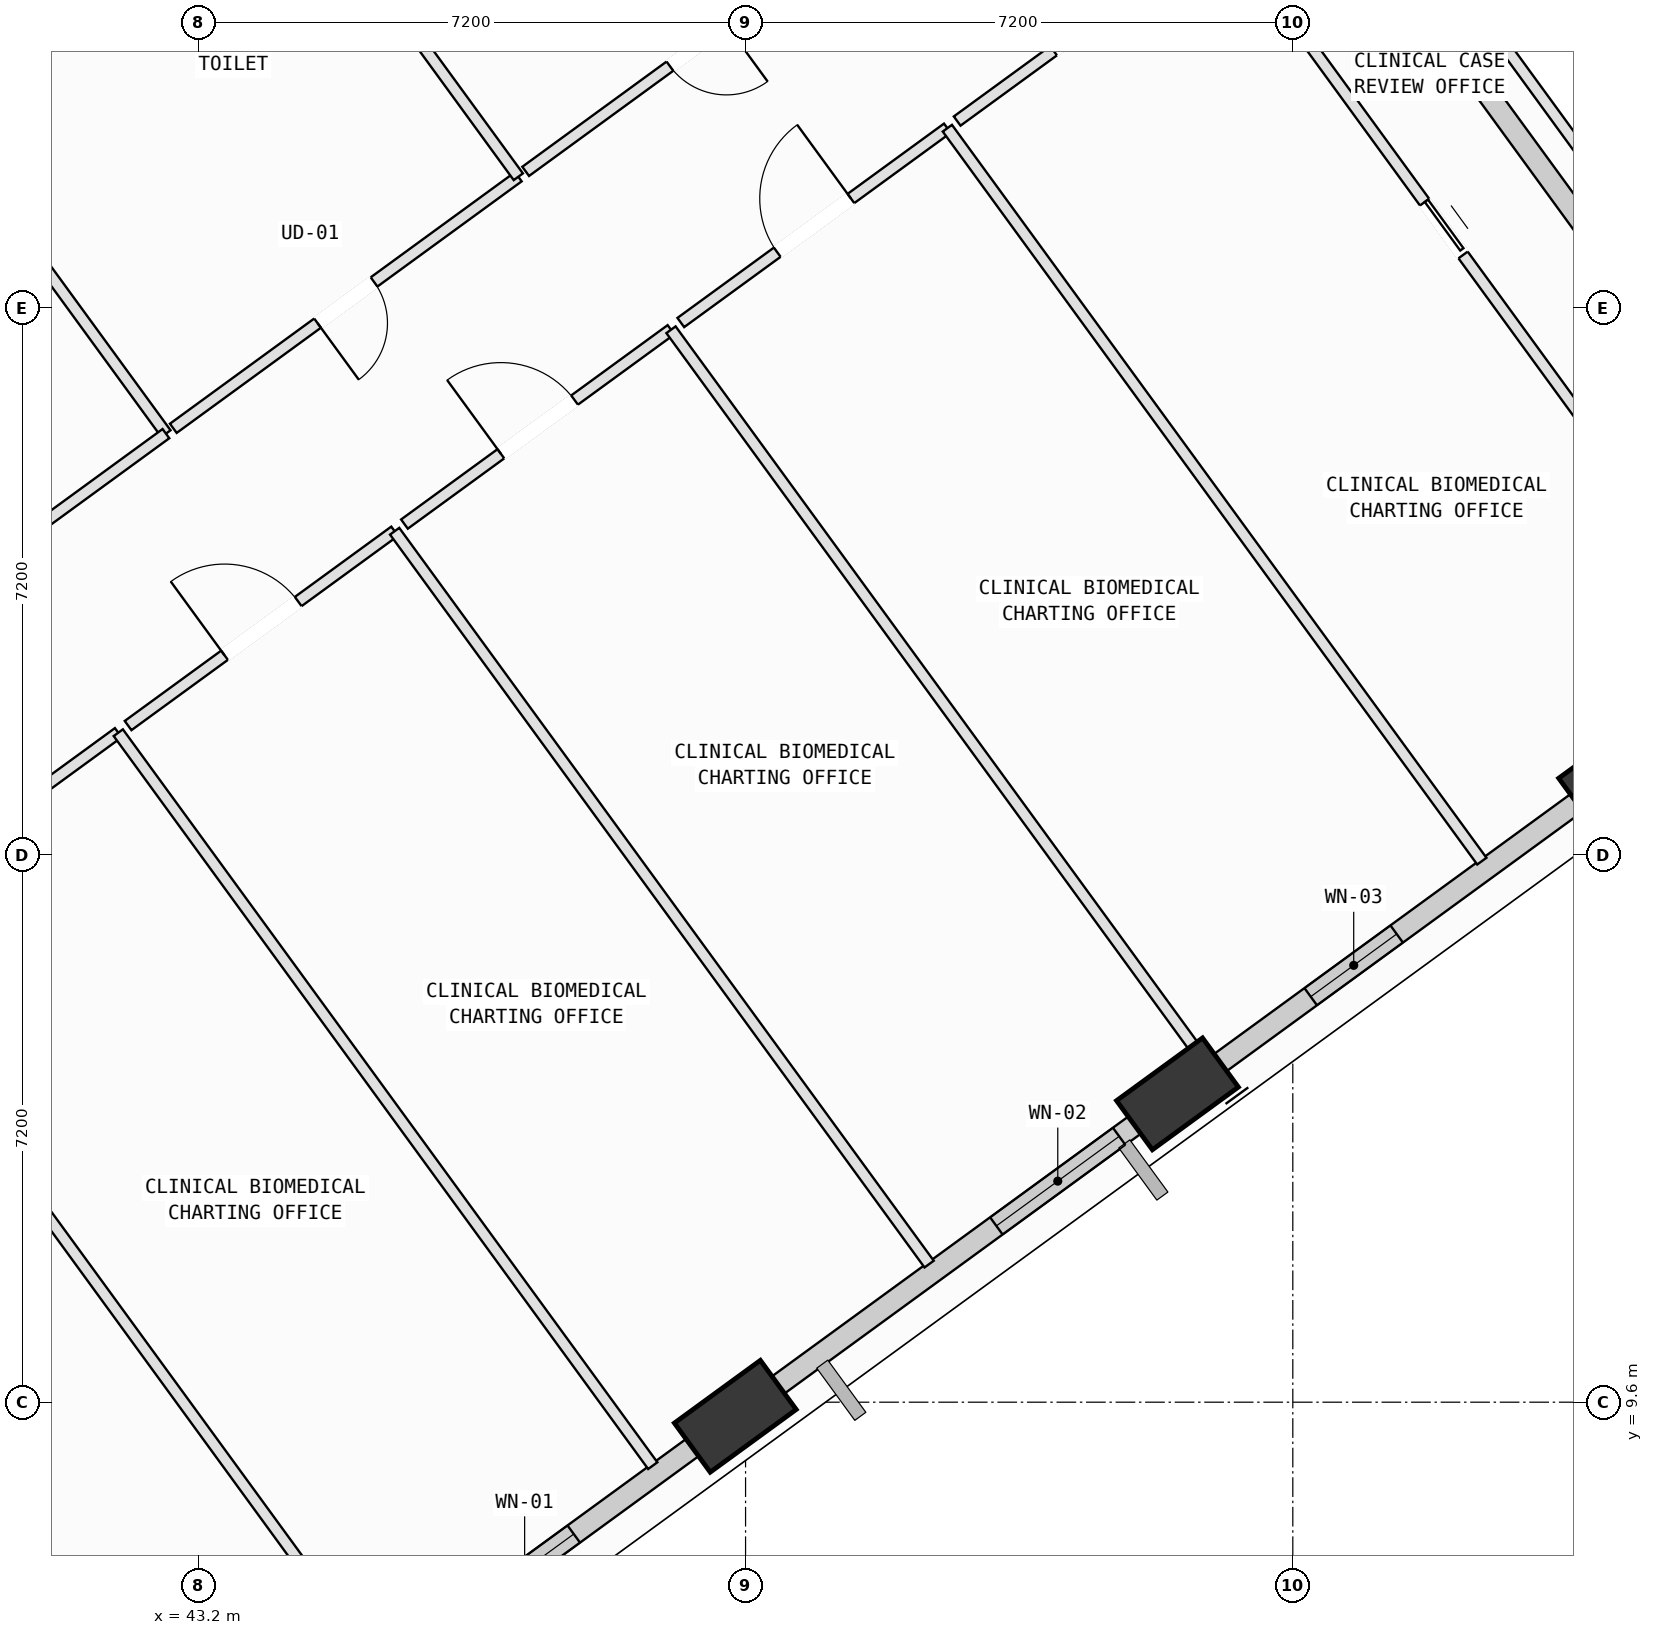
"""IFC4 building model, lengths in metres.
Left out: names, types, materials, properties, quantities, classifications, styles, units other than length and angle.
Written with IfcOpenShell. Run it as: python <this file> out.ifc"""

import sys

from ifc_helpers import new_model, si_unit, direction, frame, frame_2d, origin, origin_2d, place, context, subcontext, project, spatial, rectangle, extrude, element, fill, save


model = new_model("IFC4")
c1 = context("Model", 3, precision=1e-05, world=origin(), true_north=direction((0.0, 1.0)))
c2 = subcontext(c1, "Body", "Model", "MODEL_VIEW")
j1 = project(units=[si_unit("LENGTHUNIT", "METRE"), si_unit("PLANEANGLEUNIT", "RADIAN")], contexts=[c1])
p1 = place(None, origin())
s1 = spatial("IfcSite", under=j1, at=p1, CompositionType="ELEMENT")
p2 = place(p1, origin())
s2 = spatial("IfcBuilding", under=s1, at=p2, CompositionType="ELEMENT")
p3 = place(p2, frame((0.0, 0.0, 177.8)))
s3 = spatial("IfcBuildingStorey", under=s2, at=p3, CompositionType="ELEMENT", Elevation=177.8)
p4 = place(p3, frame((50.265, 9.415, 0.002), z_axis=(0.062891068015, 0.069277491749, 0.995613048679), x_axis=(-0.992538081723, 0.108761006327, 0.055128938255)))
e1 = element("IfcColumn", 1, at=p4, inside=s3, PredefinedType="COLUMN", context=c2, shape_type="SweptSolid", body=[
    extrude(rectangle(XDim=1.4, YDim=0.8, at=origin_2d()), origin(), (0.0, 0.0, 1.0), 4.014),
])
p5 = place(p3, frame((56.082, 13.657, 0.002), z_axis=(0.045207734937, 0.093089045596, 0.994630931699), x_axis=(-0.982823086184, -0.174186736749, 0.060973453285)))
e2 = element("IfcColumn", 2, at=p5, inside=s3, PredefinedType="COLUMN", context=c2, shape_type="SweptSolid", body=[
    extrude(rectangle(XDim=1.4, YDim=0.8, at=origin_2d()), origin(), (0.0, 0.0, 1.0), 4.018),
])
p6 = place(p3, frame((61.9, 17.899, 0.002), z_axis=(0.027414073551, 0.116691764407, 0.99278975654), x_axis=(-0.920353673675, -0.384657064263, 0.070626186825)))
e3 = element("IfcColumn", 3, at=p6, inside=s3, PredefinedType="COLUMN", context=c2, shape_type="SweptSolid", body=[
    extrude(rectangle(XDim=1.4, YDim=0.8, at=origin_2d()), origin(), (0.0, 0.0, 1.0), 4.025),
])
p7 = place(p3, frame((50.014, 9.232, 0.0), z_axis=(0.0, 0.0, 1.0), x_axis=(-0.808000900578, -0.589181249417, 0.0)))
e4 = element("IfcWall", 4, at=p7, inside=s3, PredefinedType="SOLIDWALL", context=c2, shape_type="SweptSolid", body=[
    extrude(rectangle(XDim=6.209, YDim=0.28, at=frame_2d((3.104, 0.0))), origin(), (0.0, 0.0, 1.0), 3.265),
])
p8 = place(p7, frame((2.319, 0.0, 0.75)))
e5 = element("IfcOpeningElement", 5, at=p8, cuts=e4, PredefinedType="OPENING", context=c2, shape_type="SweptSolid", body=[
    extrude(rectangle(XDim=1.6, YDim=1.95, at=frame_2d((0.8, 0.975))), frame((0.0, 0.15, 0.0), z_axis=(0.0, -1.0, 0.0), x_axis=(1.0, 0.0, 0.0)), (0.0, 0.0, 1.0), 0.3),
])
p9 = place(p3, frame((55.838, 13.479, 0.0), z_axis=(0.0, 0.0, 1.0), x_axis=(-0.807993512138, -0.589191381762, 0.0)))
e6 = element("IfcWall", 6, at=p9, inside=s3, PredefinedType="SOLIDWALL", context=c2, shape_type="SweptSolid", body=[
    extrude(rectangle(XDim=6.219, YDim=0.28, at=frame_2d((3.109, 0.0))), origin(), (0.0, 0.0, 1.0), 3.265),
])
p10 = place(p9, frame((0.646, 0.0, 0.75)))
e7 = element("IfcOpeningElement", 7, at=p10, cuts=e6, PredefinedType="OPENING", context=c2, shape_type="SweptSolid", body=[
    extrude(rectangle(XDim=2.0, YDim=1.95, at=frame_2d((1.0, 0.975))), frame((0.0, 0.15, 0.0), z_axis=(0.0, -1.0, 0.0), x_axis=(1.0, 0.0, 0.0)), (0.0, 0.0, 1.0), 0.3),
])
p11 = place(p3, frame((61.667, 17.73, 0.0), z_axis=(0.0, 0.0, 1.0), x_axis=(-0.807986195616, -0.589201415217, 0.0)))
e8 = element("IfcWall", 8, at=p11, inside=s3, PredefinedType="SOLIDWALL", context=c2, shape_type="SweptSolid", body=[
    extrude(rectangle(XDim=6.242, YDim=0.28, at=frame_2d((3.121, 0.0))), origin(), (0.0, 0.0, 1.0), 3.265),
])
p12 = place(p11, frame((3.343, 0.0, 0.75)))
e9 = element("IfcOpeningElement", 9, at=p12, cuts=e8, PredefinedType="OPENING", context=c2, shape_type="SweptSolid", body=[
    extrude(rectangle(XDim=1.4, YDim=1.85, at=frame_2d((0.7, 0.925))), frame((0.0, 0.15, 0.0), z_axis=(0.0, -1.0, 0.0), x_axis=(1.0, 0.0, 0.0)), (0.0, 0.0, 1.0), 0.3),
])
p13 = place(p3, frame((58.588, 28.975, 0.0), z_axis=(0.0, 0.0, 1.0), x_axis=(0.589215364112, -0.807976023589, 0.0)))
e10 = element("IfcWall", 10, at=p13, inside=s3, PredefinedType="SOLIDWALL", context=c2, shape_type="SweptSolid", body=[
    extrude(rectangle(XDim=6.84, YDim=0.28, at=frame_2d((3.42, 0.0))), origin(), (0.0, 0.0, 1.0), 3.265),
])
p14 = place(p3, frame((36.15, 11.527, 0.0), z_axis=(0.0, 0.0, 1.0), x_axis=(0.589195281256, -0.8079906686, 0.0)))
e11 = element("IfcWall", 11, at=p14, inside=s3, PredefinedType="PARTITIONING", context=c2, shape_type="SweptSolid", body=[
    extrude(rectangle(XDim=9.909, YDim=0.15, at=frame_2d((4.954, 0.0))), origin(), (0.0, 0.0, 1.0), 3.78),
])
p15 = place(p14, frame((4.524, 0.0, 0.0)))
e12 = element("IfcOpeningElement", 12, at=p15, cuts=e11, PredefinedType="OPENING", context=c2, shape_type="SweptSolid", body=[
    extrude(rectangle(XDim=0.86, YDim=2.06, at=frame_2d((0.43, 1.03))), frame((0.0, 0.085, 0.0), z_axis=(0.0, -1.0, 0.0), x_axis=(1.0, 0.0, 0.0)), (0.0, 0.0, 1.0), 0.17),
])
p16 = place(p3, frame((38.511, 15.757, 0.0), z_axis=(0.0, 0.0, 1.0), x_axis=(0.589203876201, -0.807984401006, 0.0)))
e13 = element("IfcWall", 13, at=p16, inside=s3, PredefinedType="PARTITIONING", context=c2, shape_type="SweptSolid", body=[
    extrude(rectangle(XDim=11.935, YDim=0.15, at=frame_2d((5.967, 0.0))), origin(), (0.0, 0.0, 1.0), 3.78),
])
p17 = place(p3, frame((38.64, 15.851, 0.0), z_axis=(0.0, 0.0, 1.0), x_axis=(0.807940029347, 0.589264718933, 0.0)))
e14 = element("IfcWall", 14, at=p17, inside=s3, PredefinedType="PARTITIONING", context=c2, shape_type="SweptSolid", body=[
    extrude(rectangle(XDim=4.341, YDim=0.15, at=frame_2d((2.17, 0.0))), origin(), (0.0, 0.0, 1.0), 3.78),
])
p18 = place(p17, frame((1.57, 0.0, 0.0)))
e15 = element("IfcOpeningElement", 15, at=p18, cuts=e14, PredefinedType="OPENING", context=c2, shape_type="SweptSolid", body=[
    extrude(rectangle(XDim=1.2, YDim=2.15, at=frame_2d((0.6, 1.075))), frame((0.0, 0.085, 0.0), z_axis=(0.0, -1.0, 0.0), x_axis=(1.0, 0.0, 0.0)), (0.0, 0.0, 1.0), 0.17),
])
p19 = place(p3, frame((42.147, 18.409, 0.0), z_axis=(0.0, 0.0, 1.0), x_axis=(0.589164923699, -0.808012804776, 0.0)))
e16 = element("IfcWall", 16, at=p19, inside=s3, PredefinedType="PARTITIONING", context=c2, shape_type="SweptSolid", body=[
    extrude(rectangle(XDim=11.936, YDim=0.15, at=frame_2d((5.968, 0.0))), origin(), (0.0, 0.0, 1.0), 3.78),
])
p20 = place(p3, frame((42.276, 18.503, 0.0), z_axis=(0.0, 0.0, 1.0), x_axis=(0.808020361036, 0.589154560494, 0.0)))
e17 = element("IfcWall", 17, at=p20, inside=s3, PredefinedType="PARTITIONING", context=c2, shape_type="SweptSolid", body=[
    extrude(rectangle(XDim=4.34, YDim=0.15, at=frame_2d((2.17, 0.0))), origin(), (0.0, 0.0, 1.0), 3.78),
])
p21 = place(p20, frame((1.57, 0.0, 0.0)))
e18 = element("IfcOpeningElement", 18, at=p21, cuts=e17, PredefinedType="OPENING", context=c2, shape_type="SweptSolid", body=[
    extrude(rectangle(XDim=1.2, YDim=2.15, at=frame_2d((0.6, 1.075))), frame((0.0, 0.085, 0.0), z_axis=(0.0, -1.0, 0.0), x_axis=(1.0, 0.0, 0.0)), (0.0, 0.0, 1.0), 0.17),
])
p22 = place(p3, frame((45.783, 21.06, 0.0), z_axis=(0.0, 0.0, 1.0), x_axis=(0.589203876201, -0.807984401006, 0.0)))
e19 = element("IfcWall", 19, at=p22, inside=s3, PredefinedType="PARTITIONING", context=c2, shape_type="SweptSolid", body=[
    extrude(rectangle(XDim=11.935, YDim=0.15, at=frame_2d((5.967, 0.0))), origin(), (0.0, 0.0, 1.0), 3.78),
])
p23 = place(p3, frame((50.949, 9.629, 0.0), z_axis=(0.0, 0.0, 1.0), x_axis=(-0.808181158002, -0.588933965611, 0.0)))
e20 = element("IfcWall", 20, at=p23, inside=s3, PredefinedType="PARTITIONING", context=c2, shape_type="SweptSolid", body=[
    extrude(rectangle(XDim=0.99, YDim=0.15, at=frame_2d((0.495, 0.0))), origin(), (0.0, 0.0, 1.0), 3.265),
])
p24 = place(p3, frame((45.912, 21.154, 0.0), z_axis=(0.0, 0.0, 1.0), x_axis=(0.808027614648, 0.5891446121, 0.0)))
e21 = element("IfcWall", 21, at=p24, inside=s3, PredefinedType="PARTITIONING", context=c2, shape_type="SweptSolid", body=[
    extrude(rectangle(XDim=4.34, YDim=0.15, at=frame_2d((2.17, 0.0))), origin(), (0.0, 0.0, 1.0), 3.78),
])
p25 = place(p24, frame((1.57, 0.0, 0.0)))
e22 = element("IfcOpeningElement", 22, at=p25, cuts=e21, PredefinedType="OPENING", context=c2, shape_type="SweptSolid", body=[
    extrude(rectangle(XDim=1.2, YDim=2.15, at=frame_2d((0.6, 1.075))), frame((0.0, 0.085, 0.0), z_axis=(0.0, -1.0, 0.0), x_axis=(1.0, 0.0, 0.0)), (0.0, 0.0, 1.0), 0.17),
])
p26 = place(p3, frame((49.419, 23.711, 0.0), z_axis=(0.0, 0.0, 1.0), x_axis=(0.589193791038, -0.807991755281, 0.0)))
e23 = element("IfcWall", 23, at=p26, inside=s3, PredefinedType="PARTITIONING", context=c2, shape_type="SweptSolid", body=[
    extrude(rectangle(XDim=12.28, YDim=0.15, at=frame_2d((6.14, 0.0))), origin(), (0.0, 0.0, 1.0), 3.78),
])
p27 = place(p3, frame((56.654, 13.789, 0.0), z_axis=(0.0, 0.0, 1.0), x_axis=(-0.808334978562, -0.588722823096, 0.0)))
e24 = element("IfcWall", 24, at=p27, inside=s3, PredefinedType="PARTITIONING", context=c2, shape_type="SweptSolid", body=[
    extrude(rectangle(XDim=0.843, YDim=0.15, at=frame_2d((0.421, 0.0))), origin(), (0.0, 0.0, 1.0), 3.265),
])
p28 = place(p3, frame((49.548, 23.806, 0.0), z_axis=(0.0, 0.0, 1.0), x_axis=(0.808000835419, 0.589181338776, 0.0)))
e25 = element("IfcWall", 25, at=p28, inside=s3, PredefinedType="PARTITIONING", context=c2, shape_type="SweptSolid", body=[
    extrude(rectangle(XDim=4.34, YDim=0.15, at=frame_2d((2.17, 0.0))), origin(), (0.0, 0.0, 1.0), 3.065),
])
p29 = place(p28, frame((1.57, 0.0, 0.0)))
e26 = element("IfcOpeningElement", 26, at=p29, cuts=e25, PredefinedType="OPENING", context=c2, shape_type="SweptSolid", body=[
    extrude(rectangle(XDim=1.2, YDim=2.15, at=frame_2d((0.6, 1.075))), frame((0.0, 0.085, 0.0), z_axis=(0.0, -1.0, 0.0), x_axis=(1.0, 0.0, 0.0)), (0.0, 0.0, 1.0), 0.17),
])
p30 = place(p3, frame((53.055, 26.363, 0.0), z_axis=(0.0, 0.0, 1.0), x_axis=(0.589164923699, -0.808012804776, 0.0)))
e27 = element("IfcWall", 27, at=p30, inside=s3, PredefinedType="PARTITIONING", context=c2, shape_type="SweptSolid", body=[
    extrude(rectangle(XDim=11.936, YDim=0.15, at=frame_2d((5.968, 0.0))), origin(), (0.0, 0.0, 1.0), 3.78),
])
p31 = place(p3, frame((53.184, 26.457, 0.0), z_axis=(0.0, 0.0, 1.0), x_axis=(0.808027614648, 0.5891446121, 0.0)))
e28 = element("IfcWall", 28, at=p31, inside=s3, PredefinedType="PARTITIONING", context=c2, shape_type="SweptSolid", body=[
    extrude(rectangle(XDim=4.34, YDim=0.15, at=frame_2d((2.17, 0.0))), origin(), (0.0, 0.0, 1.0), 3.065),
])
p32 = place(p31, frame((1.57, 0.0, 0.0)))
e29 = element("IfcOpeningElement", 29, at=p32, cuts=e28, PredefinedType="OPENING", context=c2, shape_type="SweptSolid", body=[
    extrude(rectangle(XDim=1.2, YDim=2.15, at=frame_2d((0.6, 1.075))), frame((0.0, 0.085, 0.0), z_axis=(0.0, -1.0, 0.0), x_axis=(1.0, 0.0, 0.0)), (0.0, 0.0, 1.0), 0.17),
])
p33 = place(p3, frame((56.691, 29.014, 0.0), z_axis=(0.0, 0.0, 1.0), x_axis=(0.589193100836, -0.807992258582, 0.0)))
e30 = element("IfcWall", 30, at=p33, inside=s3, PredefinedType="PARTITIONING", context=c2, shape_type="SweptSolid", body=[
    extrude(rectangle(XDim=9.83, YDim=0.15, at=frame_2d((4.915, 0.0))), origin(), (0.0, 0.0, 1.0), 3.78),
])
p34 = place(p33, frame((4.485, 0.0, 0.0)))
e31 = element("IfcOpeningElement", 31, at=p34, cuts=e30, PredefinedType="OPENING", context=c2, shape_type="SweptSolid", body=[
    extrude(rectangle(XDim=0.86, YDim=2.06, at=frame_2d((0.43, 1.03))), frame((0.0, 0.085, 0.0), z_axis=(0.0, -1.0, 0.0), x_axis=(1.0, 0.0, 0.0)), (0.0, 0.0, 1.0), 0.17),
])
p35 = place(p3, frame((39.283, 27.131, 0.0), z_axis=(0.0, 0.0, 1.0), x_axis=(0.58921251088, -0.807978104296, 0.0)))
e32 = element("IfcWall", 32, at=p35, inside=s3, PredefinedType="PARTITIONING", context=c2, shape_type="SweptSolid", body=[
    extrude(rectangle(XDim=5.925, YDim=0.15, at=frame_2d((2.962, 0.0))), origin(), (0.0, 0.0, 1.0), 3.78),
])
p36 = place(p3, frame((42.774, 22.344, 0.0), z_axis=(0.0, 0.0, 1.0), x_axis=(-0.807867723335, -0.589363844831, 0.0)))
e33 = element("IfcWall", 33, at=p36, inside=s3, PredefinedType="PARTITIONING", context=c2, shape_type="SweptSolid", body=[
    extrude(rectangle(XDim=2.823, YDim=0.15, at=frame_2d((1.412, 0.0))), origin(), (0.0, 0.0, 1.0), 3.78),
])
p37 = place(p3, frame((47.41, 25.724, 0.0), z_axis=(0.0, 0.0, 1.0), x_axis=(-0.807964856264, -0.589230677275, 0.0)))
e34 = element("IfcWall", 34, at=p37, inside=s3, PredefinedType="PARTITIONING", context=c2, shape_type="SweptSolid", body=[
    extrude(rectangle(XDim=5.618, YDim=0.15, at=frame_2d((2.809, 0.0))), origin(), (0.0, 0.0, 1.0), 3.78),
])
p38 = place(p37, frame((2.349, 0.0, 0.0)))
e35 = element("IfcOpeningElement", 35, at=p38, cuts=e34, PredefinedType="OPENING", context=c2, shape_type="SweptSolid", body=[
    extrude(rectangle(XDim=0.92, YDim=2.1, at=frame_2d((0.46, 1.05))), frame((0.0, 0.085, 0.0), z_axis=(0.0, -1.0, 0.0), x_axis=(1.0, 0.0, 0.0)), (0.0, 0.0, 1.0), 0.17),
])
p39 = place(p3, frame((43.919, 30.512, 0.0), z_axis=(0.0, 0.0, 1.0), x_axis=(0.589153663483, -0.808021015076, 0.0)))
e36 = element("IfcWall", 36, at=p39, inside=s3, PredefinedType="PARTITIONING", context=c2, shape_type="SweptSolid", body=[
    extrude(rectangle(XDim=5.925, YDim=0.15, at=frame_2d((2.963, 0.0))), origin(), (0.0, 0.0, 1.0), 3.78),
])
p40 = place(p3, frame((52.046, 29.105, 0.0), z_axis=(0.0, 0.0, 1.0), x_axis=(-0.807964856264, -0.589230677275, 0.0)))
e37 = element("IfcWall", 37, at=p40, inside=s3, PredefinedType="PARTITIONING", context=c2, shape_type="SweptSolid", body=[
    extrude(rectangle(XDim=5.618, YDim=0.15, at=frame_2d((2.809, 0.0))), origin(), (0.0, 0.0, 1.0), 3.78),
])
p41 = place(p40, frame((2.349, 0.0, 0.0)))
e38 = element("IfcOpeningElement", 38, at=p41, cuts=e37, PredefinedType="OPENING", context=c2, shape_type="SweptSolid", body=[
    extrude(rectangle(XDim=0.92, YDim=2.1, at=frame_2d((0.46, 1.05))), frame((0.0, 0.085, 0.0), z_axis=(0.0, -1.0, 0.0), x_axis=(1.0, 0.0, 0.0)), (0.0, 0.0, 1.0), 0.17),
])
p42 = place(p3, frame((58.314, 30.284, 0.0), z_axis=(0.0, 0.0, 1.0), x_axis=(0.589175591652, -0.8080050261, 0.0)))
e39 = element("IfcWall", 39, at=p42, inside=s3, PredefinedType="PARTITIONING", context=c2, shape_type="SweptSolid", body=[
    extrude(rectangle(XDim=9.669, YDim=0.15, at=frame_2d((4.835, 0.0))), origin(), (0.0, 0.0, 1.0), 3.265),
])
p43 = place(p8, origin())
e40 = element("IfcWindow", 40, at=p43, inside=s3, PartitioningType="SINGLE_PANEL", PredefinedType="WINDOW", context=c2, shape_type="SweptSolid", body=[
    extrude(rectangle(XDim=1.6, YDim=1.95, at=frame_2d((0.8, 0.975))), frame((0.0, 0.03, 0.0), z_axis=(0.0, -1.0, 0.0), x_axis=(1.0, 0.0, 0.0)), (0.0, 0.0, 1.0), 0.06),
])
fill(e5, e40)
p44 = place(p10, origin())
e41 = element("IfcWindow", 41, at=p44, inside=s3, PartitioningType="SINGLE_PANEL", PredefinedType="WINDOW", context=c2, shape_type="SweptSolid", body=[
    extrude(rectangle(XDim=2.0, YDim=1.95, at=frame_2d((1.0, 0.975))), frame((0.0, 0.03, 0.0), z_axis=(0.0, -1.0, 0.0), x_axis=(1.0, 0.0, 0.0)), (0.0, 0.0, 1.0), 0.06),
])
fill(e7, e41)
p45 = place(p12, origin())
e42 = element("IfcWindow", 42, at=p45, inside=s3, PartitioningType="SINGLE_PANEL", PredefinedType="WINDOW", context=c2, shape_type="SweptSolid", body=[
    extrude(rectangle(XDim=1.4, YDim=1.85, at=frame_2d((0.7, 0.925))), frame((0.0, 0.03, 0.0), z_axis=(0.0, -1.0, 0.0), x_axis=(1.0, 0.0, 0.0)), (0.0, 0.0, 1.0), 0.06),
])
fill(e9, e42)
p46 = place(p21, origin())
e43 = element("IfcDoor", 43, at=p46, inside=s3, OperationType="SINGLE_SWING_LEFT", PredefinedType="DOOR", context=c2, shape_type="SweptSolid", body=[
    extrude(rectangle(XDim=1.2, YDim=2.15, at=frame_2d((0.6, 1.075))), frame((0.0, 0.025, 0.0), z_axis=(0.0, -1.0, 0.0), x_axis=(1.0, 0.0, 0.0)), (0.0, 0.0, 1.0), 0.05),
])
fill(e18, e43)
p47 = place(p25, origin())
e44 = element("IfcDoor", 44, at=p47, inside=s3, OperationType="SINGLE_SWING_LEFT", PredefinedType="DOOR", context=c2, shape_type="SweptSolid", body=[
    extrude(rectangle(XDim=1.2, YDim=2.15, at=frame_2d((0.6, 1.075))), frame((0.0, 0.025, 0.0), z_axis=(0.0, -1.0, 0.0), x_axis=(1.0, 0.0, 0.0)), (0.0, 0.0, 1.0), 0.05),
])
fill(e22, e44)
p48 = place(p29, origin())
e45 = element("IfcDoor", 45, at=p48, inside=s3, OperationType="SINGLE_SWING_RIGHT", PredefinedType="DOOR", context=c2, shape_type="SweptSolid", body=[
    extrude(rectangle(XDim=1.2, YDim=2.15, at=frame_2d((0.6, 1.075))), frame((0.0, 0.025, 0.0), z_axis=(0.0, -1.0, 0.0), x_axis=(1.0, 0.0, 0.0)), (0.0, 0.0, 1.0), 0.05),
])
fill(e26, e45)
p49 = place(p32, origin())
e46 = element("IfcDoor", 46, at=p49, inside=s3, OperationType="SINGLE_SWING_LEFT", PredefinedType="DOOR", context=c2, shape_type="SweptSolid", body=[
    extrude(rectangle(XDim=1.2, YDim=2.15, at=frame_2d((0.6, 1.075))), frame((0.0, 0.025, 0.0), z_axis=(0.0, -1.0, 0.0), x_axis=(1.0, 0.0, 0.0)), (0.0, 0.0, 1.0), 0.05),
])
fill(e29, e46)
p50 = place(p38, origin())
e47 = element("IfcDoor", 47, at=p50, inside=s3, OperationType="SINGLE_SWING_RIGHT", PredefinedType="DOOR", context=c2, shape_type="SweptSolid", body=[
    extrude(rectangle(XDim=0.92, YDim=2.1, at=frame_2d((0.46, 1.05))), frame((0.0, 0.025, 0.0), z_axis=(0.0, -1.0, 0.0), x_axis=(1.0, 0.0, 0.0)), (0.0, 0.0, 1.0), 0.05),
])
fill(e35, e47)
p51 = place(p41, origin())
e48 = element("IfcDoor", 48, at=p51, inside=s3, OperationType="SINGLE_SWING_LEFT", PredefinedType="DOOR", context=c2, shape_type="SweptSolid", body=[
    extrude(rectangle(XDim=0.92, YDim=2.1, at=frame_2d((0.46, 1.05))), frame((0.0, 0.025, 0.0), z_axis=(0.0, -1.0, 0.0), x_axis=(1.0, 0.0, 0.0)), (0.0, 0.0, 1.0), 0.05),
])
fill(e38, e48)
p52 = place(p34, origin())
e49 = element("IfcDoor", 49, at=p52, inside=s3, OperationType="SLIDING_TO_LEFT", PredefinedType="DOOR", context=c2, shape_type="SweptSolid", body=[
    extrude(rectangle(XDim=0.86, YDim=2.06, at=frame_2d((0.43, 1.03))), frame((0.0, 0.025, 0.0), z_axis=(0.0, -1.0, 0.0), x_axis=(1.0, 0.0, 0.0)), (0.0, 0.0, 1.0), 0.05),
])
fill(e31, e49)
save(model, sys.argv[1])
